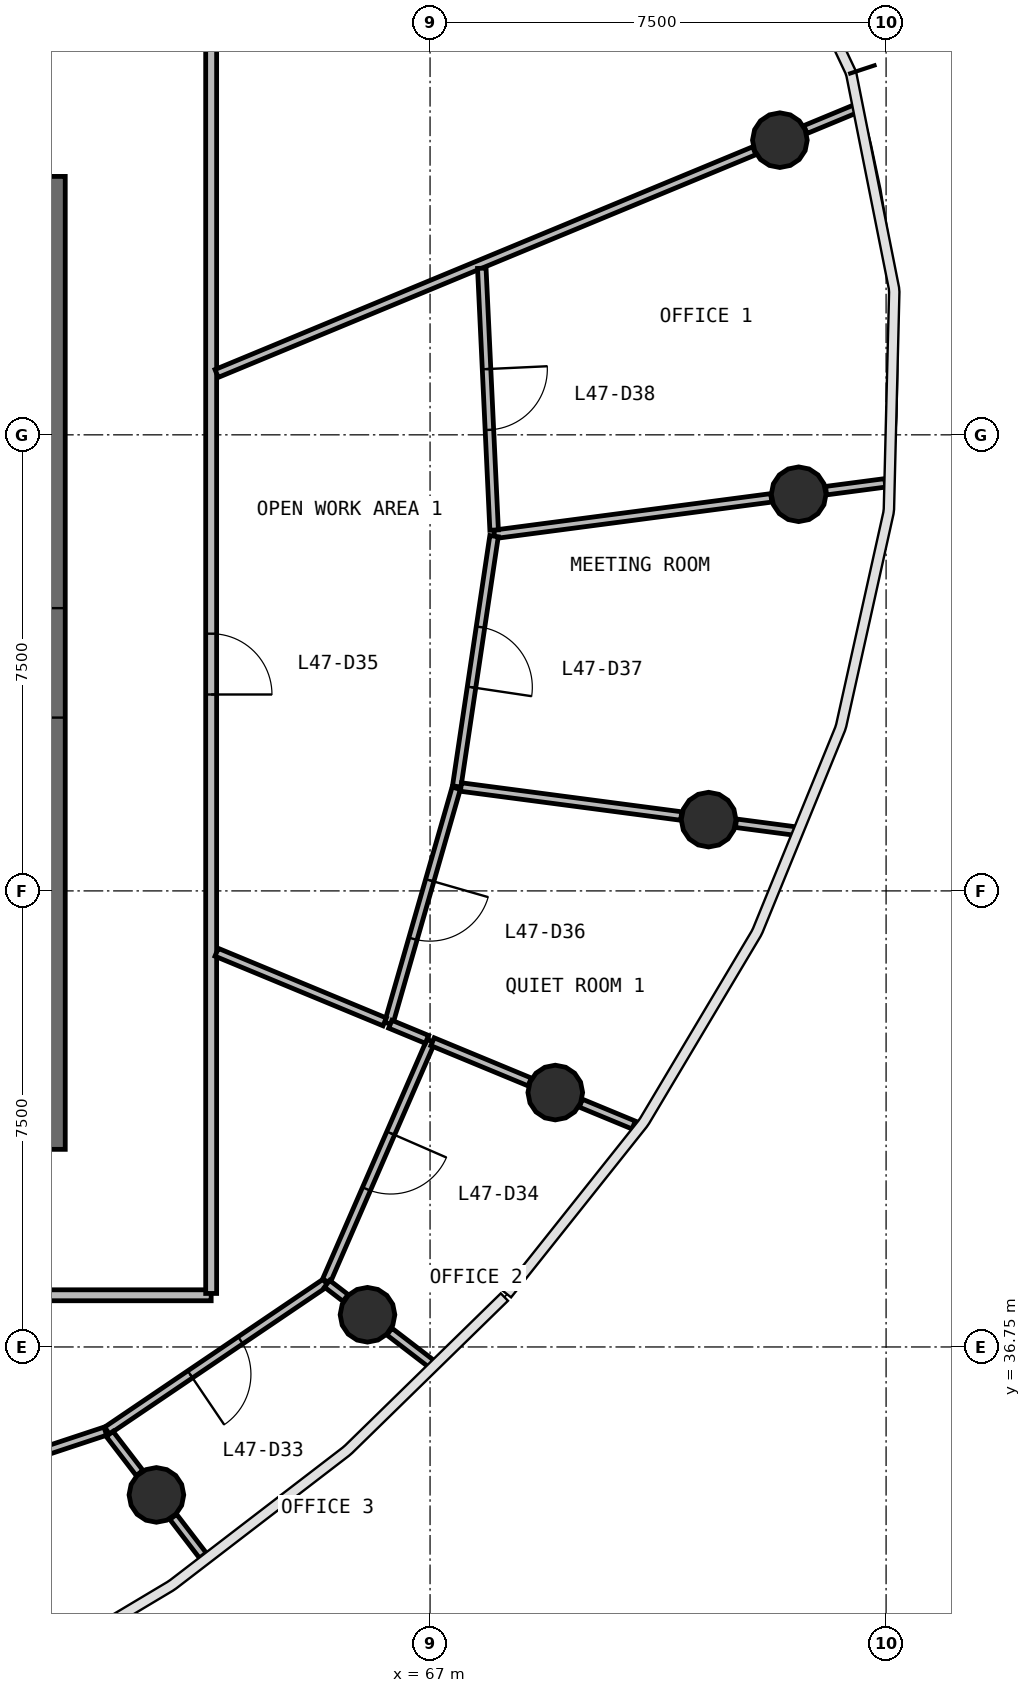
"""IFC4 building model, lengths in metres.
Left out: names, types, materials, properties, quantities, classifications, styles, units other than length and angle.
Written with IfcOpenShell. Run it as: python <this file> out.ifc"""

import sys

from ifc_helpers import new_model, si_unit, direction, frame, frame_2d, origin, origin_2d, place, context, subcontext, project, spatial, rectangle, circle, extrude, source, transform, mapped, element, fill, save


model = new_model("IFC4")
c1 = context("Model", 3, precision=1e-05, world=origin(), true_north=direction((0.0, 1.0)))
c2 = subcontext(c1, "Body", "Model", "MODEL_VIEW")
j1 = project(units=[si_unit("LENGTHUNIT", "METRE"), si_unit("PLANEANGLEUNIT", "RADIAN")], contexts=[c1])
p1 = place(None, origin())
s1 = spatial("IfcSite", under=j1, at=p1, CompositionType="ELEMENT")
p2 = place(p1, origin())
s2 = spatial("IfcBuilding", under=s1, at=p2, CompositionType="ELEMENT")
p3 = place(p2, frame((0.0, 0.0, 195.5)))
s3 = spatial("IfcBuildingStorey", under=s2, at=p3, CompositionType="ELEMENT", Elevation=195.5)
p4 = place(p3, frame((60.7, 40.0, 0.0), z_axis=(0.0, 0.0, 1.0), x_axis=(0.0, 1.0, 0.0)))
e1 = element("IfcWall", 1, at=p4, inside=s3, PredefinedType="SHEAR", context=c2, shape_type="SweptSolid", body=[
    extrude(rectangle(XDim=16.0, YDim=0.6, at=frame_2d((8.0, 0.0))), origin(), (0.0, 0.0, 1.0), 3.9),
])
p5 = place(p4, frame((7.1, 0.0, 0.0)))
e2 = element("IfcOpeningElement", 2, at=p5, cuts=e1, PredefinedType="OPENING", context=c2, shape_type="SweptSolid", body=[
    extrude(rectangle(XDim=1.8, YDim=2.1, at=frame_2d((0.9, 1.05))), frame((0.0, 0.31, 0.0), z_axis=(0.0, -1.0, 0.0), x_axis=(1.0, 0.0, 0.0)), (0.0, 0.0, 1.0), 0.62),
])
m1 = source(origin(), c2, "Body", "SweptSolid", [
    extrude(circle(Radius=0.45, at=origin_2d()), origin(), (0.0, 0.0, 1.0), 3.9),
])
for number, where, z_axis, x_axis in (
    (3, (73.062, 50.773, 0.0), (0.0, 0.0, 1.0), (1.0, 0.0, 0.0)),
    (4, (72.753, 56.596, 0.0), (0.0, 0.0, 1.0), (1.0, 0.0, 0.0)),
    (5, (62.499, 34.317, 0.0), (0.0, 0.0, 1.0), (1.0, 0.0, 0.0)),
    (6, (65.971, 37.28, 0.0), (0.0, 0.0, 1.0), (1.0, 0.0, 0.0)),
    (7, (69.059, 40.934, 0.0), (0.0, 0.0, 1.0), (1.0, 0.0, 0.0)),
    (8, (71.581, 45.422, 0.0), (0.0, 0.0, 1.0), (1.0, 0.0, 0.0)),
):
    element("IfcColumn", number, at=place(p3, frame(where, z_axis=z_axis, x_axis=x_axis)), inside=s3, PredefinedType="COLUMN", context=c2, shape_type="MappedRepresentation", body=[
        mapped(m1, transform((0.0, 0.0, 0.0), scale=1.0)),
    ])
p6 = place(p3, frame((63.4, 37.6, 0.0), z_axis=(0.0, 0.0, 1.0), x_axis=(-1.0, 0.0, 0.0)))
e9 = element("IfcWall", 9, at=p6, inside=s3, PredefinedType="PARTITIONING", context=c2, shape_type="SweptSolid", body=[
    extrude(rectangle(XDim=22.8, YDim=0.18, at=frame_2d((11.4, 0.0))), origin(), (0.0, 0.0, 1.0), 2.88),
])
p7 = place(p6, frame((12.95, 0.0, 0.0)))
e10 = element("IfcOpeningElement", 10, at=p7, cuts=e9, PredefinedType="OPENING", context=c2, shape_type="SweptSolid", body=[
    extrude(rectangle(XDim=1.0, YDim=2.1, at=frame_2d((0.5, 1.05))), frame((0.0, 0.1, 0.0), z_axis=(0.0, -1.0, 0.0), x_axis=(1.0, 0.0, 0.0)), (0.0, 0.0, 1.0), 0.2),
])
p8 = place(p6, frame((10.95, 0.0, 0.0)))
e11 = element("IfcOpeningElement", 11, at=p8, cuts=e9, PredefinedType="OPENING", context=c2, shape_type="SweptSolid", body=[
    extrude(rectangle(XDim=1.0, YDim=2.1, at=frame_2d((0.5, 1.05))), frame((0.0, 0.1, 0.0), z_axis=(0.0, -1.0, 0.0), x_axis=(1.0, 0.0, 0.0)), (0.0, 0.0, 1.0), 0.2),
])
p9 = place(p6, frame((8.75, 0.0, 0.0)))
e12 = element("IfcOpeningElement", 12, at=p9, cuts=e9, PredefinedType="OPENING", context=c2, shape_type="SweptSolid", body=[
    extrude(rectangle(XDim=1.0, YDim=2.1, at=frame_2d((0.5, 1.05))), frame((0.0, 0.1, 0.0), z_axis=(0.0, -1.0, 0.0), x_axis=(1.0, 0.0, 0.0)), (0.0, 0.0, 1.0), 0.2),
])
p10 = place(p3, frame((63.4, 58.37, 0.0), z_axis=(0.0, 0.0, 1.0), x_axis=(0.0, -1.0, 0.0)))
e13 = element("IfcWall", 13, at=p10, inside=s3, PredefinedType="PARTITIONING", context=c2, shape_type="SweptSolid", body=[
    extrude(rectangle(XDim=20.74, YDim=0.18, at=frame_2d((10.37, 0.0))), origin(), (0.0, 0.0, 1.0), 2.88),
])
p11 = place(p10, frame((9.89, 0.0, 0.0)))
e14 = element("IfcOpeningElement", 14, at=p11, cuts=e13, PredefinedType="OPENING", context=c2, shape_type="SweptSolid", body=[
    extrude(rectangle(XDim=1.0, YDim=2.1, at=frame_2d((0.5, 1.05))), frame((0.0, 0.1, 0.0), z_axis=(0.0, -1.0, 0.0), x_axis=(1.0, 0.0, 0.0)), (0.0, 0.0, 1.0), 0.2),
])
p12 = place(p3, frame((72.333, 56.422, 0.0), z_axis=(0.0, 0.0, 1.0), x_axis=(-0.923877866197, -0.382687455178, 0.0)))
e15 = element("IfcWall", 15, at=p12, inside=s3, PredefinedType="PARTITIONING", context=c2, shape_type="SweptSolid", body=[
    extrude(rectangle(XDim=9.571, YDim=0.14, at=frame_2d((4.786, 0.0))), origin(), (0.0, 0.0, 1.0), 2.88),
])
p13 = place(p3, frame((68.057, 50.114, 0.0), z_axis=(0.0, 0.0, 1.0), x_axis=(0.991446516207, 0.130513621901, 0.0)))
e16 = element("IfcWall", 16, at=p13, inside=s3, PredefinedType="PARTITIONING", context=c2, shape_type="SweptSolid", body=[
    extrude(rectangle(XDim=4.594, YDim=0.14, at=frame_2d((2.297, 0.0))), origin(), (0.0, 0.0, 1.0), 2.88),
])
p14 = place(p3, frame((67.851, 54.49, 0.0), z_axis=(0.0, 0.0, 1.0), x_axis=(0.047064643858, -0.998891845646, 0.0)))
e17 = element("IfcWall", 17, at=p14, inside=s3, PredefinedType="PARTITIONING", context=c2, shape_type="SweptSolid", body=[
    extrude(rectangle(XDim=4.311, YDim=0.14, at=frame_2d((2.155, 0.0))), origin(), (0.0, 0.0, 1.0), 2.88),
])
p15 = place(p14, frame((1.66, 0.0, 0.0)))
e18 = element("IfcOpeningElement", 18, at=p15, cuts=e17, PredefinedType="OPENING", context=c2, shape_type="SweptSolid", body=[
    extrude(rectangle(XDim=1.0, YDim=2.1, at=frame_2d((0.5, 1.05))), frame((0.0, 0.08, 0.0), z_axis=(0.0, -1.0, 0.0), x_axis=(1.0, 0.0, 0.0)), (0.0, 0.0, 1.0), 0.16),
])
p16 = place(p3, frame((65.283, 37.808, 0.0), z_axis=(0.0, 0.0, 1.0), x_axis=(-0.828127545773, -0.560539711288, 0.0)))
e19 = element("IfcWall", 19, at=p16, inside=s3, PredefinedType="PARTITIONING", context=c2, shape_type="SweptSolid", body=[
    extrude(rectangle(XDim=4.341, YDim=0.14, at=frame_2d((2.17, 0.0))), origin(), (0.0, 0.0, 1.0), 2.88),
])
p17 = place(p16, frame((1.691, 0.0, 0.0)))
e20 = element("IfcOpeningElement", 20, at=p17, cuts=e19, PredefinedType="OPENING", context=c2, shape_type="SweptSolid", body=[
    extrude(rectangle(XDim=1.0, YDim=2.1, at=frame_2d((0.5, 1.05))), frame((0.0, 0.08, 0.0), z_axis=(0.0, -1.0, 0.0), x_axis=(1.0, 0.0, 0.0)), (0.0, 0.0, 1.0), 0.16),
])
p18 = place(p3, frame((67.013, 41.781, 0.0), z_axis=(0.0, 0.0, 1.0), x_axis=(-0.399327520303, -0.916808339583, 0.0)))
e21 = element("IfcWall", 21, at=p18, inside=s3, PredefinedType="PARTITIONING", context=c2, shape_type="SweptSolid", body=[
    extrude(rectangle(XDim=4.304, YDim=0.14, at=frame_2d((2.152, 0.0))), origin(), (0.0, 0.0, 1.0), 2.88),
])
p19 = place(p18, frame((1.654, 0.0, 0.0)))
e22 = element("IfcOpeningElement", 22, at=p19, cuts=e21, PredefinedType="OPENING", context=c2, shape_type="SweptSolid", body=[
    extrude(rectangle(XDim=1.0, YDim=2.1, at=frame_2d((0.5, 1.05))), frame((0.0, 0.08, 0.0), z_axis=(0.0, -1.0, 0.0), x_axis=(1.0, 0.0, 0.0)), (0.0, 0.0, 1.0), 0.16),
])
p20 = place(p3, frame((68.052, 50.084, 0.0), z_axis=(0.0, 0.0, 1.0), x_axis=(-0.147462696702, -0.989067618053, 0.0)))
e23 = element("IfcWall", 23, at=p20, inside=s3, PredefinedType="PARTITIONING", context=c2, shape_type="SweptSolid", body=[
    extrude(rectangle(XDim=4.162, YDim=0.14, at=frame_2d((2.081, 0.0))), origin(), (0.0, 0.0, 1.0), 2.88),
])
p21 = place(p20, frame((1.512, 0.0, 0.0)))
e24 = element("IfcOpeningElement", 24, at=p21, cuts=e23, PredefinedType="OPENING", context=c2, shape_type="SweptSolid", body=[
    extrude(rectangle(XDim=1.0, YDim=2.1, at=frame_2d((0.5, 1.05))), frame((0.0, 0.08, 0.0), z_axis=(0.0, -1.0, 0.0), x_axis=(1.0, 0.0, 0.0)), (0.0, 0.0, 1.0), 0.16),
])
p22 = place(p3, frame((61.659, 35.365, 0.0), z_axis=(0.0, 0.0, 1.0), x_axis=(-0.949342227839, -0.314244068267, 0.0)))
e25 = element("IfcWall", 25, at=p22, inside=s3, PredefinedType="PARTITIONING", context=c2, shape_type="SweptSolid", body=[
    extrude(rectangle(XDim=4.1, YDim=0.14, at=frame_2d((2.05, 0.0))), origin(), (0.0, 0.0, 1.0), 2.88),
])
p23 = place(p22, frame((1.65, 0.0, 0.0)))
e26 = element("IfcOpeningElement", 26, at=p23, cuts=e25, PredefinedType="OPENING", context=c2, shape_type="SweptSolid", body=[
    extrude(rectangle(XDim=1.0, YDim=2.1, at=frame_2d((0.5, 1.05))), frame((0.0, 0.08, 0.0), z_axis=(0.0, -1.0, 0.0), x_axis=(1.0, 0.0, 0.0)), (0.0, 0.0, 1.0), 0.16),
])
p24 = place(p3, frame((67.43, 45.939, 0.0), z_axis=(0.0, 0.0, 1.0), x_axis=(-0.276146395888, -0.96111558516, 0.0)))
e27 = element("IfcWall", 27, at=p24, inside=s3, PredefinedType="PARTITIONING", context=c2, shape_type="SweptSolid", body=[
    extrude(rectangle(XDim=4.026, YDim=0.14, at=frame_2d((2.013, 0.0))), origin(), (0.0, 0.0, 1.0), 2.88),
])
p25 = place(p24, frame((1.576, 0.0, 0.0)))
e28 = element("IfcOpeningElement", 28, at=p25, cuts=e27, PredefinedType="OPENING", context=c2, shape_type="SweptSolid", body=[
    extrude(rectangle(XDim=1.0, YDim=2.1, at=frame_2d((0.5, 1.05))), frame((0.0, 0.08, 0.0), z_axis=(0.0, -1.0, 0.0), x_axis=(1.0, 0.0, 0.0)), (0.0, 0.0, 1.0), 0.16),
])
p26 = place(p3, frame((66.346, 42.058, 0.0), z_axis=(0.0, 0.0, 1.0), x_axis=(0.923916464962, -0.382594257371, 0.0)))
e29 = element("IfcWall", 29, at=p26, inside=s3, PredefinedType="PARTITIONING", context=c2, shape_type="SweptSolid", body=[
    extrude(rectangle(XDim=0.652, YDim=0.14, at=frame_2d((0.326, 0.0))), origin(), (0.0, 0.0, 1.0), 2.88),
])
p27 = place(p3, frame((63.49, 43.241, 0.0), z_axis=(0.0, 0.0, 1.0), x_axis=(0.923864621618, -0.382719428462, 0.0)))
e30 = element("IfcWall", 30, at=p27, inside=s3, PredefinedType="PARTITIONING", context=c2, shape_type="SweptSolid", body=[
    extrude(rectangle(XDim=2.991, YDim=0.14, at=frame_2d((1.496, 0.0))), origin(), (0.0, 0.0, 1.0), 2.88),
])
p28 = place(p3, frame((67.508, 45.958, 0.0), z_axis=(0.0, 0.0, 1.0), x_axis=(0.991447698438, -0.130504640766, 0.0)))
e31 = element("IfcWall", 31, at=p28, inside=s3, PredefinedType="PARTITIONING", context=c2, shape_type="SweptSolid", body=[
    extrude(rectangle(XDim=3.654, YDim=0.14, at=frame_2d((1.827, 0.0))), origin(), (0.0, 0.0, 1.0), 2.88),
])
p29 = place(p3, frame((67.041, 41.77, 0.0), z_axis=(0.0, 0.0, 1.0), x_axis=(0.923880918209, -0.382680086977, 0.0)))
e32 = element("IfcWall", 32, at=p29, inside=s3, PredefinedType="PARTITIONING", context=c2, shape_type="SweptSolid", body=[
    extrude(rectangle(XDim=1.729, YDim=0.14, at=frame_2d((0.865, 0.0))), origin(), (0.0, 0.0, 1.0), 2.88),
])
p30 = place(p3, frame((72.031, 45.363, 0.0), z_axis=(0.0, 0.0, 1.0), x_axis=(0.991439224031, -0.13056900495, 0.0)))
e33 = element("IfcWall", 33, at=p30, inside=s3, PredefinedType="PARTITIONING", context=c2, shape_type="SweptSolid", body=[
    extrude(rectangle(XDim=0.993, YDim=0.14, at=frame_2d((0.497, 0.0))), origin(), (0.0, 0.0, 1.0), 2.88),
])
p31 = place(p3, frame((73.513, 50.832, 0.0), z_axis=(0.0, 0.0, 1.0), x_axis=(0.991439080575, 0.130570094237, 0.0)))
e34 = element("IfcWall", 34, at=p31, inside=s3, PredefinedType="PARTITIONING", context=c2, shape_type="SweptSolid", body=[
    extrude(rectangle(XDim=0.983, YDim=0.14, at=frame_2d((0.492, 0.0))), origin(), (0.0, 0.0, 1.0), 2.88),
])
p32 = place(p3, frame((70.349, 40.4, 0.0), z_axis=(0.0, 0.0, 1.0), x_axis=(-0.923934603914, 0.382550451171, 0.0)))
e35 = element("IfcWall", 35, at=p32, inside=s3, PredefinedType="PARTITIONING", context=c2, shape_type="SweptSolid", body=[
    extrude(rectangle(XDim=0.941, YDim=0.14, at=frame_2d((0.47, 0.0))), origin(), (0.0, 0.0, 1.0), 2.88),
])
p33 = place(p3, frame((73.174, 56.77, 0.0), z_axis=(0.0, 0.0, 1.0), x_axis=(0.923828017367, 0.382807777256, 0.0)))
e36 = element("IfcWall", 36, at=p33, inside=s3, PredefinedType="PARTITIONING", context=c2, shape_type="SweptSolid", body=[
    extrude(rectangle(XDim=0.883, YDim=0.14, at=frame_2d((0.441, 0.0))), origin(), (0.0, 0.0, 1.0), 2.88),
])
p34 = place(p3, frame((61.73, 35.319, 0.0), z_axis=(0.0, 0.0, 1.0), x_axis=(0.608659697441, -0.793431391307, 0.0)))
e37 = element("IfcWall", 37, at=p34, inside=s3, PredefinedType="PARTITIONING", context=c2, shape_type="SweptSolid", body=[
    extrude(rectangle(XDim=0.809, YDim=0.14, at=frame_2d((0.404, 0.0))), origin(), (0.0, 0.0, 1.0), 2.88),
])
p35 = place(p3, frame((66.332, 37.003, 0.0), z_axis=(0.0, 0.0, 1.0), x_axis=(0.7933756116, -0.608732403374, 0.0)))
e38 = element("IfcWall", 38, at=p35, inside=s3, PredefinedType="PARTITIONING", context=c2, shape_type="SweptSolid", body=[
    extrude(rectangle(XDim=0.869, YDim=0.14, at=frame_2d((0.434, 0.0))), origin(), (0.0, 0.0, 1.0), 2.88),
])
p36 = place(p3, frame((62.776, 33.956, 0.0), z_axis=(0.0, 0.0, 1.0), x_axis=(0.608783126566, -0.793336690698, 0.0)))
e39 = element("IfcWall", 39, at=p36, inside=s3, PredefinedType="PARTITIONING", context=c2, shape_type="SweptSolid", body=[
    extrude(rectangle(XDim=0.802, YDim=0.14, at=frame_2d((0.401, 0.0))), origin(), (0.0, 0.0, 1.0), 2.88),
])
p37 = place(p3, frame((65.306, 37.79, 0.0), z_axis=(0.0, 0.0, 1.0), x_axis=(0.793452471415, -0.608632217029, 0.0)))
e40 = element("IfcWall", 40, at=p37, inside=s3, PredefinedType="PARTITIONING", context=c2, shape_type="SweptSolid", body=[
    extrude(rectangle(XDim=0.383, YDim=0.14, at=frame_2d((0.191, 0.0))), origin(), (0.0, 0.0, 1.0), 2.88),
])
m2 = source(origin(), c2, "Body", "SweptSolid", [
    extrude(rectangle(XDim=1.0, YDim=2.1, at=frame_2d((0.5, 1.05))), frame((0.0, 0.025, 0.0), z_axis=(0.0, -1.0, 0.0), x_axis=(1.0, 0.0, 0.0)), (0.0, 0.0, 1.0), 0.05),
])
p38 = place(p17, origin())
e41 = element("IfcDoor", 41, at=p38, inside=s3, OperationType="SINGLE_SWING_RIGHT", PredefinedType="DOOR", context=c2, shape_type="MappedRepresentation", body=[
    mapped(m2, transform((0.0, 0.0, 0.0), scale=1.0)),
])
fill(e20, e41)
p39 = place(p19, origin())
e42 = element("IfcDoor", 42, at=p39, inside=s3, OperationType="SINGLE_SWING_LEFT", PredefinedType="DOOR", context=c2, shape_type="MappedRepresentation", body=[
    mapped(m2, transform((0.0, 0.0, 0.0), scale=1.0)),
])
fill(e22, e42)
p40 = place(p11, origin())
e43 = element("IfcDoor", 43, at=p40, inside=s3, OperationType="SINGLE_SWING_RIGHT", PredefinedType="DOOR", context=c2, shape_type="MappedRepresentation", body=[
    mapped(m2, transform((0.0, 0.0, 0.0), scale=1.0)),
])
fill(e14, e43)
p41 = place(p25, origin())
e44 = element("IfcDoor", 44, at=p41, inside=s3, OperationType="SINGLE_SWING_LEFT", PredefinedType="DOOR", context=c2, shape_type="MappedRepresentation", body=[
    mapped(m2, transform((0.0, 0.0, 0.0), scale=1.0)),
])
fill(e28, e44)
p42 = place(p21, origin())
e45 = element("IfcDoor", 45, at=p42, inside=s3, OperationType="SINGLE_SWING_RIGHT", PredefinedType="DOOR", context=c2, shape_type="MappedRepresentation", body=[
    mapped(m2, transform((0.0, 0.0, 0.0), scale=1.0)),
])
fill(e24, e45)
p43 = place(p15, origin())
e46 = element("IfcDoor", 46, at=p43, inside=s3, OperationType="SINGLE_SWING_LEFT", PredefinedType="DOOR", context=c2, shape_type="MappedRepresentation", body=[
    mapped(m2, transform((0.0, 0.0, 0.0), scale=1.0)),
])
fill(e18, e46)
save(model, sys.argv[1])
